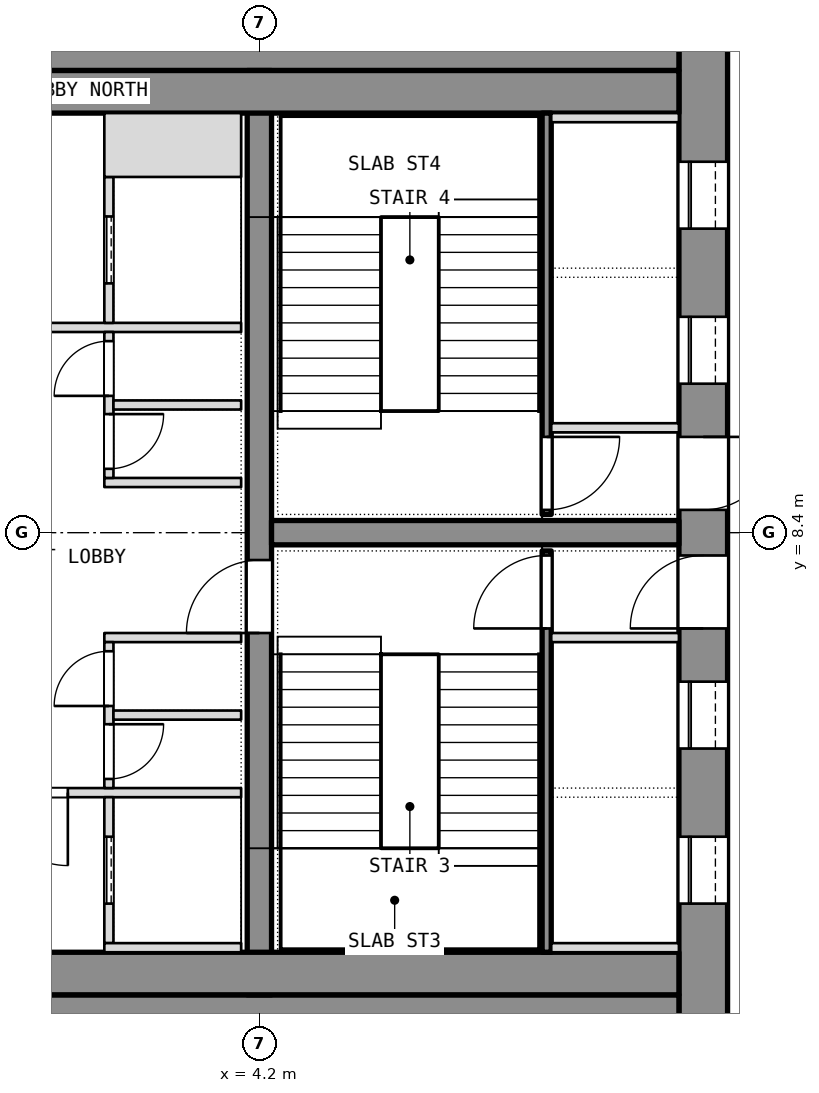
"""IFC4 building model, lengths in metres.
Left out: names, types, materials, properties, quantities, classifications, styles, units other than length and angle.
Written with IfcOpenShell. Run it as: python <this file> out.ifc"""

import sys

from ifc_helpers import new_model, si_unit, direction, frame, frame_2d, origin, place, context, subcontext, project, spatial, rectangle, extrude, element, fill, save


model = new_model("IFC4")
c1 = context("Model", 3, precision=1e-05, world=origin(), true_north=direction((0.0, 1.0)))
c2 = subcontext(c1, "Body", "Model", "MODEL_VIEW")
j1 = project(units=[si_unit("LENGTHUNIT", "METRE"), si_unit("PLANEANGLEUNIT", "RADIAN")], contexts=[c1])
p1 = place(None, origin())
s1 = spatial("IfcSite", under=j1, at=p1, CompositionType="ELEMENT")
p2 = place(p1, origin())
s2 = spatial("IfcBuilding", under=s1, at=p2, CompositionType="ELEMENT")
p3 = place(p2, frame((0.0, 0.0, 238.1)))
s3 = spatial("IfcBuildingStorey", under=s2, at=p3, CompositionType="ELEMENT", Elevation=238.1)
p4 = place(p3, frame((11.5, 0.0, 0.0), z_axis=(0.0, 0.0, 1.0), x_axis=(0.0, 1.0, 0.0)))
e1 = element("IfcWall", 1, at=p4, inside=s3, PredefinedType="SHEAR", context=c2, shape_type="SweptSolid", body=[
    extrude(rectangle(XDim=16.8, YDim=0.8, at=frame_2d((8.4, 0.0))), origin(), (0.0, 0.0, 1.0), 3.6),
])
p5 = place(p4, frame((2.3, 0.0, 0.0)))
e2 = element("IfcOpeningElement", 2, at=p5, cuts=e1, PredefinedType="OPENING", context=c2, shape_type="SweptSolid", body=[
    extrude(rectangle(XDim=1.1, YDim=2.1, at=frame_2d((0.55, 1.05))), frame((0.0, 0.4, 0.0), z_axis=(0.0, -1.0, 0.0), x_axis=(1.0, 0.0, 0.0)), (0.0, 0.0, 1.0), 0.8),
])
p6 = place(p4, frame((4.85, 0.0, 0.0)))
e3 = element("IfcOpeningElement", 3, at=p6, cuts=e1, PredefinedType="OPENING", context=c2, shape_type="SweptSolid", body=[
    extrude(rectangle(XDim=1.1, YDim=2.1, at=frame_2d((0.55, 1.05))), frame((0.0, 0.4, 0.0), z_axis=(0.0, -1.0, 0.0), x_axis=(1.0, 0.0, 0.0)), (0.0, 0.0, 1.0), 0.8),
])
p7 = place(p4, frame((6.825, 0.0, 0.0)))
e4 = element("IfcOpeningElement", 4, at=p7, cuts=e1, PredefinedType="OPENING", context=c2, shape_type="SweptSolid", body=[
    extrude(rectangle(XDim=1.2, YDim=2.1, at=frame_2d((0.6, 1.05))), frame((0.0, 0.4, 0.0), z_axis=(0.0, -1.0, 0.0), x_axis=(1.0, 0.0, 0.0)), (0.0, 0.0, 1.0), 0.8),
])
p8 = place(p4, frame((13.4, 0.0, 0.0)))
e5 = element("IfcOpeningElement", 5, at=p8, cuts=e1, PredefinedType="OPENING", context=c2, shape_type="SweptSolid", body=[
    extrude(rectangle(XDim=1.1, YDim=2.1, at=frame_2d((0.55, 1.05))), frame((0.0, 0.4, 0.0), z_axis=(0.0, -1.0, 0.0), x_axis=(1.0, 0.0, 0.0)), (0.0, 0.0, 1.0), 0.8),
])
p9 = place(p4, frame((10.85, 0.0, 0.0)))
e6 = element("IfcOpeningElement", 6, at=p9, cuts=e1, PredefinedType="OPENING", context=c2, shape_type="SweptSolid", body=[
    extrude(rectangle(XDim=1.1, YDim=2.1, at=frame_2d((0.55, 1.05))), frame((0.0, 0.4, 0.0), z_axis=(0.0, -1.0, 0.0), x_axis=(1.0, 0.0, 0.0)), (0.0, 0.0, 1.0), 0.8),
])
p10 = place(p4, frame((8.775, 0.0, 0.0)))
e7 = element("IfcOpeningElement", 7, at=p10, cuts=e1, PredefinedType="OPENING", context=c2, shape_type="SweptSolid", body=[
    extrude(rectangle(XDim=1.2, YDim=2.1, at=frame_2d((0.6, 1.05))), frame((0.0, 0.4, 0.0), z_axis=(0.0, -1.0, 0.0), x_axis=(1.0, 0.0, 0.0)), (0.0, 0.0, 1.0), 0.8),
])
for number, where, z_axis, x_axis in (
    (8, (-11.1, 0.4, 0.0), (0.0, 0.0, 1.0), (1.0, 0.0, 0.0)),
    (9, (-11.1, 16.4, 0.0), (0.0, 0.0, 1.0), (1.0, 0.0, 0.0)),
):
    element("IfcWall", number, at=place(p3, frame(where, z_axis=z_axis, x_axis=x_axis)), inside=s3, PredefinedType="SHEAR", context=c2, shape_type="SweptSolid", body=[
        extrude(rectangle(XDim=22.2, YDim=0.8, at=frame_2d((11.1, 0.0))), origin(), (0.0, 0.0, 1.0), 3.6),
    ])
p11 = place(p3, frame((4.2, 0.8, 0.0), z_axis=(0.0, 0.0, 1.0), x_axis=(0.0, 1.0, 0.0)))
e10 = element("IfcWall", 10, at=p11, inside=s3, PredefinedType="SHEAR", context=c2, shape_type="SweptSolid", body=[
    extrude(rectangle(XDim=15.2, YDim=0.4, at=frame_2d((7.6, 0.0))), origin(), (0.0, 0.0, 1.0), 3.6),
])
p12 = place(p11, frame((5.95, 0.0, 0.0)))
e11 = element("IfcOpeningElement", 11, at=p12, cuts=e10, PredefinedType="OPENING", context=c2, shape_type="SweptSolid", body=[
    extrude(rectangle(XDim=1.2, YDim=2.1, at=frame_2d((0.6, 1.05))), frame((0.0, 0.2, 0.0), z_axis=(0.0, -1.0, 0.0), x_axis=(1.0, 0.0, 0.0)), (0.0, 0.0, 1.0), 0.4),
])
p13 = place(p3, frame((4.4, 8.4, 0.0), z_axis=(0.0, 0.0, 1.0), x_axis=(1.0, 0.0, 0.0)))
e12 = element("IfcWall", 12, at=p13, inside=s3, PredefinedType="SHEAR", context=c2, shape_type="SweptSolid", body=[
    extrude(rectangle(XDim=6.7, YDim=0.4, at=frame_2d((3.35, 0.0))), origin(), (0.0, 0.0, 1.0), 3.6),
])
for number, where, z_axis, x_axis in (
    (13, (-11.1, 1.15, 0.0), (0.0, 0.0, 1.0), (1.0, 0.0, 0.0)),
    (14, (-11.1, 15.65, 0.0), (0.0, 0.0, 1.0), (1.0, 0.0, 0.0)),
):
    element("IfcWall", number, at=place(p3, frame(where, z_axis=z_axis, x_axis=x_axis)), inside=s3, PredefinedType="PARTITIONING", context=c2, shape_type="SweptSolid", body=[
        extrude(rectangle(XDim=22.2, YDim=0.7, at=frame_2d((11.1, 0.0))), origin(), (0.0, 0.0, 1.0), 3.34),
    ])
p14 = place(p3, frame((8.925, 1.5, 0.0), z_axis=(0.0, 0.0, 1.0), x_axis=(0.0, 1.0, 0.0)))
e15 = element("IfcWall", 15, at=p14, inside=s3, PredefinedType="SHEAR", context=c2, shape_type="SweptSolid", body=[
    extrude(rectangle(XDim=6.6, YDim=0.15, at=frame_2d((3.3, 0.0))), origin(), (0.0, 0.0, 1.0), 3.34),
])
p15 = place(p14, frame((5.325, 0.0, 0.0)))
e16 = element("IfcOpeningElement", 16, at=p15, cuts=e15, PredefinedType="OPENING", context=c2, shape_type="SweptSolid", body=[
    extrude(rectangle(XDim=1.2, YDim=2.1, at=frame_2d((0.6, 1.05))), frame((0.0, 0.075, 0.0), z_axis=(0.0, -1.0, 0.0), x_axis=(1.0, 0.0, 0.0)), (0.0, 0.0, 1.0), 0.15),
])
for number, where, z_axis, x_axis in (
    (17, (9.0, 6.675, 0.0), (0.0, 0.0, 1.0), (1.0, 0.0, 0.0)),
    (18, (9.0, 1.575, 0.0), (0.0, 0.0, 1.0), (1.0, 0.0, 0.0)),
):
    element("IfcWall", number, at=place(p3, frame(where, z_axis=z_axis, x_axis=x_axis)), inside=s3, PredefinedType="SHEAR", context=c2, shape_type="SweptSolid", body=[
        extrude(rectangle(XDim=2.1, YDim=0.15, at=frame_2d((1.05, 0.0))), origin(), (0.0, 0.0, 1.0), 3.6),
    ])
p16 = place(p3, frame((8.925, 8.7, 0.0), z_axis=(0.0, 0.0, 1.0), x_axis=(0.0, 1.0, 0.0)))
e19 = element("IfcWall", 19, at=p16, inside=s3, PredefinedType="SHEAR", context=c2, shape_type="SweptSolid", body=[
    extrude(rectangle(XDim=6.6, YDim=0.15, at=frame_2d((3.3, 0.0))), origin(), (0.0, 0.0, 1.0), 3.34),
])
p17 = place(p16, frame((0.075, 0.0, 0.0)))
e20 = element("IfcOpeningElement", 20, at=p17, cuts=e19, PredefinedType="OPENING", context=c2, shape_type="SweptSolid", body=[
    extrude(rectangle(XDim=1.2, YDim=2.1, at=frame_2d((0.6, 1.05))), frame((0.0, 0.075, 0.0), z_axis=(0.0, -1.0, 0.0), x_axis=(1.0, 0.0, 0.0)), (0.0, 0.0, 1.0), 0.15),
])
for number, where, z_axis, x_axis in (
    (21, (9.0, 10.125, 0.0), (0.0, 0.0, 1.0), (1.0, 0.0, 0.0)),
    (22, (9.0, 15.225, 0.0), (0.0, 0.0, 1.0), (1.0, 0.0, 0.0)),
):
    element("IfcWall", number, at=place(p3, frame(where, z_axis=z_axis, x_axis=x_axis)), inside=s3, PredefinedType="SHEAR", context=c2, shape_type="SweptSolid", body=[
        extrude(rectangle(XDim=2.1, YDim=0.15, at=frame_2d((1.05, 0.0))), origin(), (0.0, 0.0, 1.0), 3.6),
    ])
p18 = place(p3, frame((-3.9, 4.125, 0.0), z_axis=(0.0, 0.0, 1.0), x_axis=(1.0, 0.0, 0.0)))
e23 = element("IfcWall", 23, at=p18, inside=s3, PredefinedType="PARTITIONING", context=c2, shape_type="SweptSolid", body=[
    extrude(rectangle(XDim=7.8, YDim=0.15, at=frame_2d((3.9, 0.0))), origin(), (0.0, 0.0, 1.0), 3.34),
])
p19 = place(p18, frame((3.75, 0.0, 0.0)))
e24 = element("IfcOpeningElement", 24, at=p19, cuts=e23, PredefinedType="OPENING", context=c2, shape_type="SweptSolid", body=[
    extrude(rectangle(XDim=1.2, YDim=2.1, at=frame_2d((0.6, 1.05))), frame((0.0, 0.075, 0.0), z_axis=(0.0, -1.0, 0.0), x_axis=(1.0, 0.0, 0.0)), (0.0, 0.0, 1.0), 0.15),
])
p20 = place(p3, frame((-3.9, 11.775, 0.0), z_axis=(0.0, 0.0, 1.0), x_axis=(1.0, 0.0, 0.0)))
e25 = element("IfcWall", 25, at=p20, inside=s3, PredefinedType="PARTITIONING", context=c2, shape_type="SweptSolid", body=[
    extrude(rectangle(XDim=7.8, YDim=0.15, at=frame_2d((3.9, 0.0))), origin(), (0.0, 0.0, 1.0), 3.34),
])
p21 = place(p20, frame((3.3, 0.0, 0.0)))
e26 = element("IfcOpeningElement", 26, at=p21, cuts=e25, PredefinedType="OPENING", context=c2, shape_type="SweptSolid", body=[
    extrude(rectangle(XDim=1.2, YDim=2.1, at=frame_2d((0.6, 1.05))), frame((0.0, 0.075, 0.0), z_axis=(0.0, -1.0, 0.0), x_axis=(1.0, 0.0, 0.0)), (0.0, 0.0, 1.0), 0.15),
])
p22 = place(p3, frame((1.725, 1.65, 0.0), z_axis=(0.0, 0.0, 1.0), x_axis=(0.0, 1.0, 0.0)))
e27 = element("IfcWall", 27, at=p22, inside=s3, PredefinedType="SHEAR", context=c2, shape_type="SweptSolid", body=[
    extrude(rectangle(XDim=2.4, YDim=0.15, at=frame_2d((1.2, 0.0))), origin(), (0.0, 0.0, 1.0), 3.6),
])
p23 = place(p22, frame((0.65, 0.0, 0.0)))
e28 = element("IfcOpeningElement", 28, at=p23, cuts=e27, PredefinedType="OPENING", context=c2, shape_type="SweptSolid", body=[
    extrude(rectangle(XDim=1.1, YDim=2.1, at=frame_2d((0.55, 1.05))), frame((0.0, 0.075, 0.0), z_axis=(0.0, -1.0, 0.0), x_axis=(1.0, 0.0, 0.0)), (0.0, 0.0, 1.0), 0.15),
])
p24 = place(p3, frame((1.65, 1.575, 0.0), z_axis=(0.0, 0.0, 1.0), x_axis=(1.0, 0.0, 0.0)))
e29 = element("IfcWall", 29, at=p24, inside=s3, PredefinedType="SHEAR", context=c2, shape_type="SweptSolid", body=[
    extrude(rectangle(XDim=2.25, YDim=0.15, at=frame_2d((1.125, 0.0))), origin(), (0.0, 0.0, 1.0), 3.6),
])
p25 = place(p3, frame((1.725, 11.85, 0.0), z_axis=(0.0, 0.0, 1.0), x_axis=(0.0, 1.0, 0.0)))
e30 = element("IfcWall", 30, at=p25, inside=s3, PredefinedType="SHEAR", context=c2, shape_type="SweptSolid", body=[
    extrude(rectangle(XDim=2.4, YDim=0.15, at=frame_2d((1.2, 0.0))), origin(), (0.0, 0.0, 1.0), 3.6),
])
p26 = place(p25, frame((0.65, 0.0, 0.0)))
e31 = element("IfcOpeningElement", 31, at=p26, cuts=e30, PredefinedType="OPENING", context=c2, shape_type="SweptSolid", body=[
    extrude(rectangle(XDim=1.1, YDim=2.1, at=frame_2d((0.55, 1.05))), frame((0.0, 0.075, 0.0), z_axis=(0.0, -1.0, 0.0), x_axis=(1.0, 0.0, 0.0)), (0.0, 0.0, 1.0), 0.15),
])
p27 = place(p3, frame((1.65, 14.775, 0.0), z_axis=(0.0, 0.0, 1.0), x_axis=(1.0, 0.0, 0.0)))
e32 = element("IfcWall", 32, at=p27, inside=s3, PredefinedType="SHEAR", context=c2, shape_type="SweptSolid", body=[
    extrude(rectangle(XDim=2.25, YDim=1.05, at=frame_2d((1.125, 0.0))), origin(), (0.0, 0.0, 1.0), 3.6),
])
for number, where, z_axis, x_axis in (
    (33, (1.65, 6.675, 0.0), (0.0, 0.0, 1.0), (1.0, 0.0, 0.0)),
    (34, (1.65, 9.225, 0.0), (0.0, 0.0, 1.0), (1.0, 0.0, 0.0)),
):
    element("IfcWall", number, at=place(p3, frame(where, z_axis=z_axis, x_axis=x_axis)), inside=s3, PredefinedType="PARTITIONING", context=c2, shape_type="SweptSolid", body=[
        extrude(rectangle(XDim=2.25, YDim=0.15, at=frame_2d((1.125, 0.0))), origin(), (0.0, 0.0, 1.0), 3.34),
    ])
p28 = place(p3, frame((1.725, 4.2, 0.0), z_axis=(0.0, 0.0, 1.0), x_axis=(0.0, 1.0, 0.0)))
e35 = element("IfcWall", 35, at=p28, inside=s3, PredefinedType="PARTITIONING", context=c2, shape_type="SweptSolid", body=[
    extrude(rectangle(XDim=2.4, YDim=0.15, at=frame_2d((1.2, 0.0))), origin(), (0.0, 0.0, 1.0), 3.34),
])
p29 = place(p28, frame((0.15, 0.0, 0.0)))
e36 = element("IfcOpeningElement", 36, at=p29, cuts=e35, PredefinedType="OPENING", context=c2, shape_type="SweptSolid", body=[
    extrude(rectangle(XDim=0.9, YDim=2.1, at=frame_2d((0.45, 1.05))), frame((0.0, 0.075, 0.0), z_axis=(0.0, -1.0, 0.0), x_axis=(1.0, 0.0, 0.0)), (0.0, 0.0, 1.0), 0.15),
])
p30 = place(p28, frame((1.35, 0.0, 0.0)))
e37 = element("IfcOpeningElement", 37, at=p30, cuts=e35, PredefinedType="OPENING", context=c2, shape_type="SweptSolid", body=[
    extrude(rectangle(XDim=0.9, YDim=2.1, at=frame_2d((0.45, 1.05))), frame((0.0, 0.075, 0.0), z_axis=(0.0, -1.0, 0.0), x_axis=(1.0, 0.0, 0.0)), (0.0, 0.0, 1.0), 0.15),
])
p31 = place(p3, frame((1.725, 9.3, 0.0), z_axis=(0.0, 0.0, 1.0), x_axis=(0.0, 1.0, 0.0)))
e38 = element("IfcWall", 38, at=p31, inside=s3, PredefinedType="PARTITIONING", context=c2, shape_type="SweptSolid", body=[
    extrude(rectangle(XDim=2.4, YDim=0.15, at=frame_2d((1.2, 0.0))), origin(), (0.0, 0.0, 1.0), 3.34),
])
p32 = place(p31, frame((0.15, 0.0, 0.0)))
e39 = element("IfcOpeningElement", 39, at=p32, cuts=e38, PredefinedType="OPENING", context=c2, shape_type="SweptSolid", body=[
    extrude(rectangle(XDim=0.9, YDim=2.1, at=frame_2d((0.45, 1.05))), frame((0.0, 0.075, 0.0), z_axis=(0.0, -1.0, 0.0), x_axis=(1.0, 0.0, 0.0)), (0.0, 0.0, 1.0), 0.15),
])
p33 = place(p31, frame((1.35, 0.0, 0.0)))
e40 = element("IfcOpeningElement", 40, at=p33, cuts=e38, PredefinedType="OPENING", context=c2, shape_type="SweptSolid", body=[
    extrude(rectangle(XDim=0.9, YDim=2.1, at=frame_2d((0.45, 1.05))), frame((0.0, 0.075, 0.0), z_axis=(0.0, -1.0, 0.0), x_axis=(1.0, 0.0, 0.0)), (0.0, 0.0, 1.0), 0.15),
])
for number, where, z_axis, x_axis in (
    (41, (1.8, 5.4, 0.0), (0.0, 0.0, 1.0), (1.0, 0.0, 0.0)),
    (42, (1.8, 10.5, 0.0), (0.0, 0.0, 1.0), (1.0, 0.0, 0.0)),
):
    element("IfcWall", number, at=place(p3, frame(where, z_axis=z_axis, x_axis=x_axis)), inside=s3, PredefinedType="PARTITIONING", context=c2, shape_type="SweptSolid", body=[
        extrude(rectangle(XDim=2.1, YDim=0.15, at=frame_2d((1.05, 0.0))), origin(), (0.0, 0.0, 1.0), 3.34),
    ])
p34 = place(p5, origin())
e43 = element("IfcDoor", 43, at=p34, inside=s3, OperationType="SLIDING_TO_LEFT", PredefinedType="DOOR", context=c2, shape_type="SweptSolid", body=[
    extrude(rectangle(XDim=1.1, YDim=2.1, at=frame_2d((0.55, 1.05))), frame((0.0, 0.025, 0.0), z_axis=(0.0, -1.0, 0.0), x_axis=(1.0, 0.0, 0.0)), (0.0, 0.0, 1.0), 0.05),
])
fill(e2, e43)
p35 = place(p6, origin())
e44 = element("IfcDoor", 44, at=p35, inside=s3, OperationType="SLIDING_TO_LEFT", PredefinedType="DOOR", context=c2, shape_type="SweptSolid", body=[
    extrude(rectangle(XDim=1.1, YDim=2.1, at=frame_2d((0.55, 1.05))), frame((0.0, 0.025, 0.0), z_axis=(0.0, -1.0, 0.0), x_axis=(1.0, 0.0, 0.0)), (0.0, 0.0, 1.0), 0.05),
])
fill(e3, e44)
p36 = place(p7, origin())
e45 = element("IfcDoor", 45, at=p36, inside=s3, OperationType="SINGLE_SWING_LEFT", PredefinedType="DOOR", context=c2, shape_type="SweptSolid", body=[
    extrude(rectangle(XDim=1.2, YDim=2.1, at=frame_2d((0.6, 1.05))), frame((0.0, 0.025, 0.0), z_axis=(0.0, -1.0, 0.0), x_axis=(1.0, 0.0, 0.0)), (0.0, 0.0, 1.0), 0.05),
])
fill(e4, e45)
p37 = place(p15, origin())
e46 = element("IfcDoor", 46, at=p37, inside=s3, OperationType="SINGLE_SWING_LEFT", PredefinedType="DOOR", context=c2, shape_type="SweptSolid", body=[
    extrude(rectangle(XDim=1.2, YDim=2.1, at=frame_2d((0.6, 1.05))), frame((0.0, 0.025, 0.0), z_axis=(0.0, -1.0, 0.0), x_axis=(1.0, 0.0, 0.0)), (0.0, 0.0, 1.0), 0.05),
])
fill(e16, e46)
p38 = place(p8, origin())
e47 = element("IfcDoor", 47, at=p38, inside=s3, OperationType="SLIDING_TO_LEFT", PredefinedType="DOOR", context=c2, shape_type="SweptSolid", body=[
    extrude(rectangle(XDim=1.1, YDim=2.1, at=frame_2d((0.55, 1.05))), frame((0.0, 0.025, 0.0), z_axis=(0.0, -1.0, 0.0), x_axis=(1.0, 0.0, 0.0)), (0.0, 0.0, 1.0), 0.05),
])
fill(e5, e47)
p39 = place(p9, origin())
e48 = element("IfcDoor", 48, at=p39, inside=s3, OperationType="SLIDING_TO_LEFT", PredefinedType="DOOR", context=c2, shape_type="SweptSolid", body=[
    extrude(rectangle(XDim=1.1, YDim=2.1, at=frame_2d((0.55, 1.05))), frame((0.0, 0.025, 0.0), z_axis=(0.0, -1.0, 0.0), x_axis=(1.0, 0.0, 0.0)), (0.0, 0.0, 1.0), 0.05),
])
fill(e6, e48)
p40 = place(p10, origin())
e49 = element("IfcDoor", 49, at=p40, inside=s3, OperationType="SINGLE_SWING_LEFT", PredefinedType="DOOR", context=c2, shape_type="SweptSolid", body=[
    extrude(rectangle(XDim=1.2, YDim=2.1, at=frame_2d((0.6, 1.05))), frame((0.0, 0.025, 0.0), z_axis=(0.0, -1.0, 0.0), x_axis=(1.0, 0.0, 0.0)), (0.0, 0.0, 1.0), 0.05),
])
fill(e7, e49)
p41 = place(p17, origin())
e50 = element("IfcDoor", 50, at=p41, inside=s3, OperationType="SINGLE_SWING_LEFT", PredefinedType="DOOR", context=c2, shape_type="SweptSolid", body=[
    extrude(rectangle(XDim=1.2, YDim=2.1, at=frame_2d((0.6, 1.05))), frame((0.0, 0.025, 0.0), z_axis=(0.0, -1.0, 0.0), x_axis=(1.0, 0.0, 0.0)), (0.0, 0.0, 1.0), 0.05),
])
fill(e20, e50)
p42 = place(p29, origin())
e51 = element("IfcDoor", 51, at=p42, inside=s3, OperationType="SINGLE_SWING_LEFT", PredefinedType="DOOR", context=c2, shape_type="SweptSolid", body=[
    extrude(rectangle(XDim=0.9, YDim=2.1, at=frame_2d((0.45, 1.05))), frame((0.0, 0.025, 0.0), z_axis=(0.0, -1.0, 0.0), x_axis=(1.0, 0.0, 0.0)), (0.0, 0.0, 1.0), 0.05),
])
fill(e36, e51)
p43 = place(p30, origin())
e52 = element("IfcDoor", 52, at=p43, inside=s3, OperationType="SINGLE_SWING_LEFT", PredefinedType="DOOR", context=c2, shape_type="SweptSolid", body=[
    extrude(rectangle(XDim=0.9, YDim=2.1, at=frame_2d((0.45, 1.05))), frame((0.0, 0.025, 0.0), z_axis=(0.0, -1.0, 0.0), x_axis=(1.0, 0.0, 0.0)), (0.0, 0.0, 1.0), 0.05),
])
fill(e37, e52)
p44 = place(p32, origin())
e53 = element("IfcDoor", 53, at=p44, inside=s3, OperationType="SINGLE_SWING_LEFT", PredefinedType="DOOR", context=c2, shape_type="SweptSolid", body=[
    extrude(rectangle(XDim=0.9, YDim=2.1, at=frame_2d((0.45, 1.05))), frame((0.0, 0.025, 0.0), z_axis=(0.0, -1.0, 0.0), x_axis=(1.0, 0.0, 0.0)), (0.0, 0.0, 1.0), 0.05),
])
fill(e39, e53)
p45 = place(p33, origin())
e54 = element("IfcDoor", 54, at=p45, inside=s3, OperationType="SINGLE_SWING_LEFT", PredefinedType="DOOR", context=c2, shape_type="SweptSolid", body=[
    extrude(rectangle(XDim=0.9, YDim=2.1, at=frame_2d((0.45, 1.05))), frame((0.0, 0.025, 0.0), z_axis=(0.0, -1.0, 0.0), x_axis=(1.0, 0.0, 0.0)), (0.0, 0.0, 1.0), 0.05),
])
fill(e40, e54)
p46 = place(p23, origin())
e55 = element("IfcDoor", 55, at=p46, inside=s3, OperationType="SLIDING_TO_LEFT", PredefinedType="DOOR", context=c2, shape_type="SweptSolid", body=[
    extrude(rectangle(XDim=1.1, YDim=2.1, at=frame_2d((0.55, 1.05))), frame((0.0, 0.025, 0.0), z_axis=(0.0, -1.0, 0.0), x_axis=(1.0, 0.0, 0.0)), (0.0, 0.0, 1.0), 0.05),
])
fill(e28, e55)
p47 = place(p26, origin())
e56 = element("IfcDoor", 56, at=p47, inside=s3, OperationType="SLIDING_TO_LEFT", PredefinedType="DOOR", context=c2, shape_type="SweptSolid", body=[
    extrude(rectangle(XDim=1.1, YDim=2.1, at=frame_2d((0.55, 1.05))), frame((0.0, 0.025, 0.0), z_axis=(0.0, -1.0, 0.0), x_axis=(1.0, 0.0, 0.0)), (0.0, 0.0, 1.0), 0.05),
])
fill(e31, e56)
p48 = place(p19, origin())
e57 = element("IfcDoor", 57, at=p48, inside=s3, OperationType="SINGLE_SWING_LEFT", PredefinedType="DOOR", context=c2, shape_type="SweptSolid", body=[
    extrude(rectangle(XDim=1.2, YDim=2.1, at=frame_2d((0.6, 1.05))), frame((0.0, 0.025, 0.0), z_axis=(0.0, -1.0, 0.0), x_axis=(1.0, 0.0, 0.0)), (0.0, 0.0, 1.0), 0.05),
])
fill(e24, e57)
p49 = place(p12, origin())
e58 = element("IfcDoor", 58, at=p49, inside=s3, OperationType="SINGLE_SWING_LEFT", PredefinedType="DOOR", context=c2, shape_type="SweptSolid", body=[
    extrude(rectangle(XDim=1.2, YDim=2.1, at=frame_2d((0.6, 1.05))), frame((0.0, 0.025, 0.0), z_axis=(0.0, -1.0, 0.0), x_axis=(1.0, 0.0, 0.0)), (0.0, 0.0, 1.0), 0.05),
])
fill(e11, e58)
save(model, sys.argv[1])
